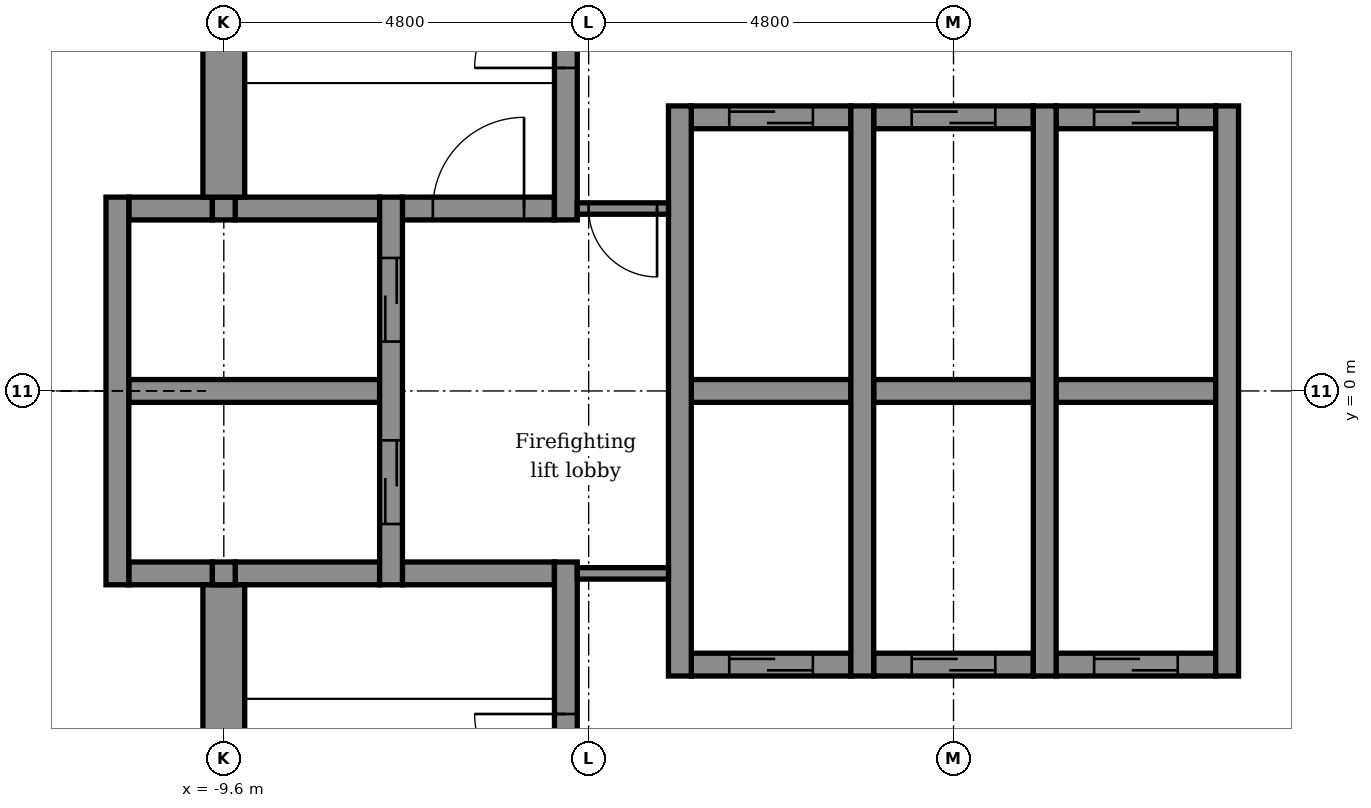
"""IFC4 building model, lengths in metres.
Left out: names, types, materials, properties, quantities, classifications, styles, units other than length and angle.
Written with IfcOpenShell. Run it as: python <this file> out.ifc"""

import sys

from ifc_helpers import new_model, si_unit, direction, frame, frame_2d, origin, place, context, subcontext, project, spatial, rectangle, extrude, element, fill, save


model = new_model("IFC4")
c1 = context("Model", 3, precision=1e-05, world=origin(), true_north=direction((0.0, 1.0)))
c2 = subcontext(c1, "Body", "Model", "MODEL_VIEW")
j1 = project(units=[si_unit("LENGTHUNIT", "METRE"), si_unit("PLANEANGLEUNIT", "RADIAN")], contexts=[c1])
p1 = place(None, origin())
s1 = spatial("IfcSite", under=j1, at=p1, CompositionType="ELEMENT")
p2 = place(p1, origin())
s2 = spatial("IfcBuilding", under=s1, at=p2, CompositionType="ELEMENT")
p3 = place(p2, frame((0.0, 0.0, 273.5)))
s3 = spatial("IfcBuildingStorey", under=s2, at=p3, CompositionType="ELEMENT", Elevation=273.5)
p4 = place(p3, frame((-3.45, -3.6, -0.15), z_axis=(0.0, 0.0, 1.0), x_axis=(1.0, 0.0, 0.0)))
e1 = element("IfcWall", 1, at=p4, inside=s3, PredefinedType="STANDARD", context=c2, shape_type="SweptSolid", body=[
    extrude(rectangle(XDim=2.1, YDim=0.3, at=frame_2d((1.05, 0.0))), origin(), (0.0, 0.0, 1.0), 3.9),
])
p5 = place(p4, frame((0.5, 0.0, 0.15)))
e2 = element("IfcOpeningElement", 2, at=p5, cuts=e1, PredefinedType="OPENING", context=c2, shape_type="SweptSolid", body=[
    extrude(rectangle(XDim=1.1, YDim=2.1, at=frame_2d((0.55, 1.05))), frame((0.0, 0.16, 0.0), z_axis=(0.0, -1.0, 0.0), x_axis=(1.0, 0.0, 0.0)), (0.0, 0.0, 1.0), 0.32),
])
p6 = place(p3, frame((-1.05, -3.6, -0.15), z_axis=(0.0, 0.0, 1.0), x_axis=(1.0, 0.0, 0.0)))
e3 = element("IfcWall", 3, at=p6, inside=s3, PredefinedType="STANDARD", context=c2, shape_type="SweptSolid", body=[
    extrude(rectangle(XDim=2.1, YDim=0.3, at=frame_2d((1.05, 0.0))), origin(), (0.0, 0.0, 1.0), 3.9),
])
p7 = place(p6, frame((0.5, 0.0, 0.15)))
e4 = element("IfcOpeningElement", 4, at=p7, cuts=e3, PredefinedType="OPENING", context=c2, shape_type="SweptSolid", body=[
    extrude(rectangle(XDim=1.1, YDim=2.1, at=frame_2d((0.55, 1.05))), frame((0.0, 0.16, 0.0), z_axis=(0.0, -1.0, 0.0), x_axis=(1.0, 0.0, 0.0)), (0.0, 0.0, 1.0), 0.32),
])
p8 = place(p3, frame((1.35, -3.6, -0.15), z_axis=(0.0, 0.0, 1.0), x_axis=(1.0, 0.0, 0.0)))
e5 = element("IfcWall", 5, at=p8, inside=s3, PredefinedType="STANDARD", context=c2, shape_type="SweptSolid", body=[
    extrude(rectangle(XDim=2.1, YDim=0.3, at=frame_2d((1.05, 0.0))), origin(), (0.0, 0.0, 1.0), 3.9),
])
p9 = place(p8, frame((0.5, 0.0, 0.15)))
e6 = element("IfcOpeningElement", 6, at=p9, cuts=e5, PredefinedType="OPENING", context=c2, shape_type="SweptSolid", body=[
    extrude(rectangle(XDim=1.1, YDim=2.1, at=frame_2d((0.55, 1.05))), frame((0.0, 0.16, 0.0), z_axis=(0.0, -1.0, 0.0), x_axis=(1.0, 0.0, 0.0)), (0.0, 0.0, 1.0), 0.32),
])
p10 = place(p3, frame((-10.85, -2.4, -0.15), z_axis=(0.0, 0.0, 1.0), x_axis=(1.0, 0.0, 0.0)))
e7 = element("IfcWall", 7, at=p10, inside=s3, PredefinedType="STANDARD", context=c2, shape_type="SweptSolid", body=[
    extrude(rectangle(XDim=1.1, YDim=0.3, at=frame_2d((0.55, 0.0))), origin(), (0.0, 0.0, 1.0), 3.9),
])
p11 = place(p3, frame((-9.45, -2.4, -0.15), z_axis=(0.0, 0.0, 1.0), x_axis=(1.0, 0.0, 0.0)))
e8 = element("IfcWall", 8, at=p11, inside=s3, PredefinedType="STANDARD", context=c2, shape_type="SweptSolid", body=[
    extrude(rectangle(XDim=1.9, YDim=0.3, at=frame_2d((0.95, 0.0))), origin(), (0.0, 0.0, 1.0), 3.9),
])
p12 = place(p3, frame((-7.25, -2.4, -0.15), z_axis=(0.0, 0.0, 1.0), x_axis=(1.0, 0.0, 0.0)))
e9 = element("IfcWall", 9, at=p12, inside=s3, PredefinedType="STANDARD", context=c2, shape_type="SweptSolid", body=[
    extrude(rectangle(XDim=2.0, YDim=0.3, at=frame_2d((1.0, 0.0))), origin(), (0.0, 0.0, 1.0), 3.9),
])
p13 = place(p3, frame((-10.85, 0.0, -0.15), z_axis=(0.0, 0.0, 1.0), x_axis=(1.0, 0.0, 0.0)))
e10 = element("IfcWall", 10, at=p13, inside=s3, PredefinedType="STANDARD", context=c2, shape_type="SweptSolid", body=[
    extrude(rectangle(XDim=3.3, YDim=0.3, at=frame_2d((1.65, 0.0))), origin(), (0.0, 0.0, 1.0), 3.9),
])
p14 = place(p3, frame((-3.45, 0.0, -0.15), z_axis=(0.0, 0.0, 1.0), x_axis=(1.0, 0.0, 0.0)))
e11 = element("IfcWall", 11, at=p14, inside=s3, PredefinedType="STANDARD", context=c2, shape_type="SweptSolid", body=[
    extrude(rectangle(XDim=2.1, YDim=0.3, at=frame_2d((1.05, 0.0))), origin(), (0.0, 0.0, 1.0), 3.9),
])
p15 = place(p3, frame((-1.05, 0.0, -0.15), z_axis=(0.0, 0.0, 1.0), x_axis=(1.0, 0.0, 0.0)))
e12 = element("IfcWall", 12, at=p15, inside=s3, PredefinedType="STANDARD", context=c2, shape_type="SweptSolid", body=[
    extrude(rectangle(XDim=2.1, YDim=0.3, at=frame_2d((1.05, 0.0))), origin(), (0.0, 0.0, 1.0), 3.9),
])
p16 = place(p3, frame((1.35, 0.0, -0.15), z_axis=(0.0, 0.0, 1.0), x_axis=(1.0, 0.0, 0.0)))
e13 = element("IfcWall", 13, at=p16, inside=s3, PredefinedType="STANDARD", context=c2, shape_type="SweptSolid", body=[
    extrude(rectangle(XDim=2.1, YDim=0.3, at=frame_2d((1.05, 0.0))), origin(), (0.0, 0.0, 1.0), 3.9),
])
p17 = place(p3, frame((-10.85, 2.4, -0.15), z_axis=(0.0, 0.0, 1.0), x_axis=(1.0, 0.0, 0.0)))
e14 = element("IfcWall", 14, at=p17, inside=s3, PredefinedType="STANDARD", context=c2, shape_type="SweptSolid", body=[
    extrude(rectangle(XDim=1.1, YDim=0.3, at=frame_2d((0.55, 0.0))), origin(), (0.0, 0.0, 1.0), 3.9),
])
p18 = place(p3, frame((-9.45, 2.4, -0.15), z_axis=(0.0, 0.0, 1.0), x_axis=(1.0, 0.0, 0.0)))
e15 = element("IfcWall", 15, at=p18, inside=s3, PredefinedType="STANDARD", context=c2, shape_type="SweptSolid", body=[
    extrude(rectangle(XDim=1.9, YDim=0.3, at=frame_2d((0.95, 0.0))), origin(), (0.0, 0.0, 1.0), 3.9),
])
p19 = place(p3, frame((-7.25, 2.4, -0.15), z_axis=(0.0, 0.0, 1.0), x_axis=(1.0, 0.0, 0.0)))
e16 = element("IfcWall", 16, at=p19, inside=s3, PredefinedType="STANDARD", context=c2, shape_type="SweptSolid", body=[
    extrude(rectangle(XDim=2.0, YDim=0.3, at=frame_2d((1.0, 0.0))), origin(), (0.0, 0.0, 1.0), 3.9),
])
p20 = place(p19, frame((0.4, 0.0, 0.15)))
e17 = element("IfcOpeningElement", 17, at=p20, cuts=e16, PredefinedType="OPENING", context=c2, shape_type="SweptSolid", body=[
    extrude(rectangle(XDim=1.2, YDim=2.1, at=frame_2d((0.6, 1.05))), frame((0.0, 0.16, 0.0), z_axis=(0.0, -1.0, 0.0), x_axis=(1.0, 0.0, 0.0)), (0.0, 0.0, 1.0), 0.32),
])
p21 = place(p3, frame((-3.45, 3.6, -0.15), z_axis=(0.0, 0.0, 1.0), x_axis=(1.0, 0.0, 0.0)))
e18 = element("IfcWall", 18, at=p21, inside=s3, PredefinedType="STANDARD", context=c2, shape_type="SweptSolid", body=[
    extrude(rectangle(XDim=2.1, YDim=0.3, at=frame_2d((1.05, 0.0))), origin(), (0.0, 0.0, 1.0), 3.9),
])
p22 = place(p21, frame((0.5, 0.0, 0.15)))
e19 = element("IfcOpeningElement", 19, at=p22, cuts=e18, PredefinedType="OPENING", context=c2, shape_type="SweptSolid", body=[
    extrude(rectangle(XDim=1.1, YDim=2.1, at=frame_2d((0.55, 1.05))), frame((0.0, 0.16, 0.0), z_axis=(0.0, -1.0, 0.0), x_axis=(1.0, 0.0, 0.0)), (0.0, 0.0, 1.0), 0.32),
])
p23 = place(p3, frame((-1.05, 3.6, -0.15), z_axis=(0.0, 0.0, 1.0), x_axis=(1.0, 0.0, 0.0)))
e20 = element("IfcWall", 20, at=p23, inside=s3, PredefinedType="STANDARD", context=c2, shape_type="SweptSolid", body=[
    extrude(rectangle(XDim=2.1, YDim=0.3, at=frame_2d((1.05, 0.0))), origin(), (0.0, 0.0, 1.0), 3.9),
])
p24 = place(p23, frame((0.5, 0.0, 0.15)))
e21 = element("IfcOpeningElement", 21, at=p24, cuts=e20, PredefinedType="OPENING", context=c2, shape_type="SweptSolid", body=[
    extrude(rectangle(XDim=1.1, YDim=2.1, at=frame_2d((0.55, 1.05))), frame((0.0, 0.16, 0.0), z_axis=(0.0, -1.0, 0.0), x_axis=(1.0, 0.0, 0.0)), (0.0, 0.0, 1.0), 0.32),
])
p25 = place(p3, frame((1.35, 3.6, -0.15), z_axis=(0.0, 0.0, 1.0), x_axis=(1.0, 0.0, 0.0)))
e22 = element("IfcWall", 22, at=p25, inside=s3, PredefinedType="STANDARD", context=c2, shape_type="SweptSolid", body=[
    extrude(rectangle(XDim=2.1, YDim=0.3, at=frame_2d((1.05, 0.0))), origin(), (0.0, 0.0, 1.0), 3.9),
])
p26 = place(p25, frame((0.5, 0.0, 0.15)))
e23 = element("IfcOpeningElement", 23, at=p26, cuts=e22, PredefinedType="OPENING", context=c2, shape_type="SweptSolid", body=[
    extrude(rectangle(XDim=1.1, YDim=2.1, at=frame_2d((0.55, 1.05))), frame((0.0, 0.16, 0.0), z_axis=(0.0, -1.0, 0.0), x_axis=(1.0, 0.0, 0.0)), (0.0, 0.0, 1.0), 0.32),
])
p27 = place(p3, frame((-11.0, -2.55, -0.15), z_axis=(0.0, 0.0, 1.0), x_axis=(0.0, 1.0, 0.0)))
e24 = element("IfcWall", 24, at=p27, inside=s3, PredefinedType="STANDARD", context=c2, shape_type="SweptSolid", body=[
    extrude(rectangle(XDim=5.1, YDim=0.3, at=frame_2d((2.55, 0.0))), origin(), (0.0, 0.0, 1.0), 3.9),
])
p28 = place(p3, frame((-9.6, -10.15, -0.15), z_axis=(0.0, 0.0, 1.0), x_axis=(0.0, 1.0, 0.0)))
e25 = element("IfcWall", 25, at=p28, inside=s3, PredefinedType="SHEAR", context=c2, shape_type="SweptSolid", body=[
    extrude(rectangle(XDim=7.6, YDim=0.55, at=frame_2d((3.8, 0.0))), origin(), (0.0, 0.0, 1.0), 3.9),
])
for number, where, z_axis, x_axis in (
    (26, (-9.6, -2.55, -0.15), (0.0, 0.0, 1.0), (0.0, 1.0, 0.0)),
    (27, (-9.6, 2.25, -0.15), (0.0, 0.0, 1.0), (0.0, 1.0, 0.0)),
):
    element("IfcWall", number, at=place(p3, frame(where, z_axis=z_axis, x_axis=x_axis)), inside=s3, PredefinedType="STANDARD", context=c2, shape_type="SweptSolid", body=[
        extrude(rectangle(XDim=0.3, YDim=0.3, at=frame_2d((0.15, 0.0))), origin(), (0.0, 0.0, 1.0), 3.9),
    ])
p29 = place(p3, frame((-9.6, 2.55, -0.15), z_axis=(0.0, 0.0, 1.0), x_axis=(0.0, 1.0, 0.0)))
e28 = element("IfcWall", 28, at=p29, inside=s3, PredefinedType="SHEAR", context=c2, shape_type="SweptSolid", body=[
    extrude(rectangle(XDim=7.6, YDim=0.55, at=frame_2d((3.8, 0.0))), origin(), (0.0, 0.0, 1.0), 3.9),
])
p30 = place(p3, frame((-7.4, -2.55, -0.15), z_axis=(0.0, 0.0, 1.0), x_axis=(0.0, 1.0, 0.0)))
e29 = element("IfcWall", 29, at=p30, inside=s3, PredefinedType="STANDARD", context=c2, shape_type="SweptSolid", body=[
    extrude(rectangle(XDim=5.1, YDim=0.3, at=frame_2d((2.55, 0.0))), origin(), (0.0, 0.0, 1.0), 3.9),
])
p31 = place(p30, frame((0.8, 0.0, 0.15)))
e30 = element("IfcOpeningElement", 30, at=p31, cuts=e29, PredefinedType="OPENING", context=c2, shape_type="SweptSolid", body=[
    extrude(rectangle(XDim=1.1, YDim=2.1, at=frame_2d((0.55, 1.05))), frame((0.0, 0.16, 0.0), z_axis=(0.0, -1.0, 0.0), x_axis=(1.0, 0.0, 0.0)), (0.0, 0.0, 1.0), 0.32),
])
p32 = place(p30, frame((3.2, 0.0, 0.15)))
e31 = element("IfcOpeningElement", 31, at=p32, cuts=e29, PredefinedType="OPENING", context=c2, shape_type="SweptSolid", body=[
    extrude(rectangle(XDim=1.1, YDim=2.1, at=frame_2d((0.55, 1.05))), frame((0.0, 0.16, 0.0), z_axis=(0.0, -1.0, 0.0), x_axis=(1.0, 0.0, 0.0)), (0.0, 0.0, 1.0), 0.32),
])
p33 = place(p3, frame((-5.1, -9.325, -0.15), z_axis=(0.0, 0.0, 1.0), x_axis=(0.0, 1.0, 0.0)))
e32 = element("IfcWall", 32, at=p33, inside=s3, PredefinedType="STANDARD", context=c2, shape_type="SweptSolid", body=[
    extrude(rectangle(XDim=7.075, YDim=0.3, at=frame_2d((3.538, 0.0))), origin(), (0.0, 0.0, 1.0), 3.9),
])
p34 = place(p33, frame((3.875, 0.0, 0.15)))
e33 = element("IfcOpeningElement", 33, at=p34, cuts=e32, PredefinedType="OPENING", context=c2, shape_type="SweptSolid", body=[
    extrude(rectangle(XDim=1.2, YDim=2.1, at=frame_2d((0.6, 1.05))), frame((0.0, 0.16, 0.0), z_axis=(0.0, -1.0, 0.0), x_axis=(1.0, 0.0, 0.0)), (0.0, 0.0, 1.0), 0.32),
])
p35 = place(p3, frame((-5.1, 2.25, -0.15), z_axis=(0.0, 0.0, 1.0), x_axis=(0.0, 1.0, 0.0)))
e34 = element("IfcWall", 34, at=p35, inside=s3, PredefinedType="STANDARD", context=c2, shape_type="SweptSolid", body=[
    extrude(rectangle(XDim=7.075, YDim=0.3, at=frame_2d((3.538, 0.0))), origin(), (0.0, 0.0, 1.0), 3.9),
])
p36 = place(p35, frame((2.0, 0.0, 0.15)))
e35 = element("IfcOpeningElement", 35, at=p36, cuts=e34, PredefinedType="OPENING", context=c2, shape_type="SweptSolid", body=[
    extrude(rectangle(XDim=1.2, YDim=2.1, at=frame_2d((0.6, 1.05))), frame((0.0, 0.16, 0.0), z_axis=(0.0, -1.0, 0.0), x_axis=(1.0, 0.0, 0.0)), (0.0, 0.0, 1.0), 0.32),
])
for number, where, z_axis, x_axis in (
    (36, (-3.6, -3.75, -0.15), (0.0, 0.0, 1.0), (0.0, 1.0, 0.0)),
    (37, (-1.2, -3.75, -0.15), (0.0, 0.0, 1.0), (0.0, 1.0, 0.0)),
    (38, (1.2, -3.75, -0.15), (0.0, 0.0, 1.0), (0.0, 1.0, 0.0)),
    (39, (3.6, -3.75, -0.15), (0.0, 0.0, 1.0), (0.0, 1.0, 0.0)),
):
    element("IfcWall", number, at=place(p3, frame(where, z_axis=z_axis, x_axis=x_axis)), inside=s3, PredefinedType="STANDARD", context=c2, shape_type="SweptSolid", body=[
        extrude(rectangle(XDim=7.5, YDim=0.3, at=frame_2d((3.75, 0.0))), origin(), (0.0, 0.0, 1.0), 3.9),
    ])
p37 = place(p3, frame((-4.95, 2.4, 0.0), z_axis=(0.0, 0.0, 1.0), x_axis=(1.0, 0.0, 0.0)))
e40 = element("IfcWall", 40, at=p37, inside=s3, PredefinedType="PARTITIONING", context=c2, shape_type="SweptSolid", body=[
    extrude(rectangle(XDim=1.2, YDim=0.15, at=frame_2d((0.6, 0.0))), origin(), (0.0, 0.0, 1.0), 3.75),
])
p38 = place(p37, frame((0.15, 0.0, 0.0)))
e41 = element("IfcOpeningElement", 41, at=p38, cuts=e40, PredefinedType="OPENING", context=c2, shape_type="SweptSolid", body=[
    extrude(rectangle(XDim=0.9, YDim=2.1, at=frame_2d((0.45, 1.05))), frame((0.0, 0.085, 0.0), z_axis=(0.0, -1.0, 0.0), x_axis=(1.0, 0.0, 0.0)), (0.0, 0.0, 1.0), 0.17),
])
p39 = place(p3, frame((-4.95, -2.4, 0.0), z_axis=(0.0, 0.0, 1.0), x_axis=(1.0, 0.0, 0.0)))
e42 = element("IfcWall", 42, at=p39, inside=s3, PredefinedType="PARTITIONING", context=c2, shape_type="SweptSolid", body=[
    extrude(rectangle(XDim=1.2, YDim=0.15, at=frame_2d((0.6, 0.0))), origin(), (0.0, 0.0, 1.0), 3.75),
])
p40 = place(p31, origin())
e43 = element("IfcDoor", 43, at=p40, inside=s3, OperationType="DOUBLE_DOOR_SLIDING", PredefinedType="DOOR", context=c2, shape_type="SweptSolid", body=[
    extrude(rectangle(XDim=1.1, YDim=2.1, at=frame_2d((0.55, 1.05))), frame((0.0, 0.025, 0.0), z_axis=(0.0, -1.0, 0.0), x_axis=(1.0, 0.0, 0.0)), (0.0, 0.0, 1.0), 0.05),
])
fill(e30, e43)
p41 = place(p32, origin())
e44 = element("IfcDoor", 44, at=p41, inside=s3, OperationType="DOUBLE_DOOR_SLIDING", PredefinedType="DOOR", context=c2, shape_type="SweptSolid", body=[
    extrude(rectangle(XDim=1.1, YDim=2.1, at=frame_2d((0.55, 1.05))), frame((0.0, 0.025, 0.0), z_axis=(0.0, -1.0, 0.0), x_axis=(1.0, 0.0, 0.0)), (0.0, 0.0, 1.0), 0.05),
])
fill(e31, e44)
p42 = place(p22, origin())
e45 = element("IfcDoor", 45, at=p42, inside=s3, OperationType="DOUBLE_DOOR_SLIDING", PredefinedType="DOOR", context=c2, shape_type="SweptSolid", body=[
    extrude(rectangle(XDim=1.1, YDim=2.1, at=frame_2d((0.55, 1.05))), frame((0.0, 0.025, 0.0), z_axis=(0.0, -1.0, 0.0), x_axis=(1.0, 0.0, 0.0)), (0.0, 0.0, 1.0), 0.05),
])
fill(e19, e45)
p43 = place(p24, origin())
e46 = element("IfcDoor", 46, at=p43, inside=s3, OperationType="DOUBLE_DOOR_SLIDING", PredefinedType="DOOR", context=c2, shape_type="SweptSolid", body=[
    extrude(rectangle(XDim=1.1, YDim=2.1, at=frame_2d((0.55, 1.05))), frame((0.0, 0.025, 0.0), z_axis=(0.0, -1.0, 0.0), x_axis=(1.0, 0.0, 0.0)), (0.0, 0.0, 1.0), 0.05),
])
fill(e21, e46)
p44 = place(p26, origin())
e47 = element("IfcDoor", 47, at=p44, inside=s3, OperationType="DOUBLE_DOOR_SLIDING", PredefinedType="DOOR", context=c2, shape_type="SweptSolid", body=[
    extrude(rectangle(XDim=1.1, YDim=2.1, at=frame_2d((0.55, 1.05))), frame((0.0, 0.025, 0.0), z_axis=(0.0, -1.0, 0.0), x_axis=(1.0, 0.0, 0.0)), (0.0, 0.0, 1.0), 0.05),
])
fill(e23, e47)
p45 = place(p5, origin())
e48 = element("IfcDoor", 48, at=p45, inside=s3, OperationType="DOUBLE_DOOR_SLIDING", PredefinedType="DOOR", context=c2, shape_type="SweptSolid", body=[
    extrude(rectangle(XDim=1.1, YDim=2.1, at=frame_2d((0.55, 1.05))), frame((0.0, 0.025, 0.0), z_axis=(0.0, -1.0, 0.0), x_axis=(1.0, 0.0, 0.0)), (0.0, 0.0, 1.0), 0.05),
])
fill(e2, e48)
p46 = place(p7, origin())
e49 = element("IfcDoor", 49, at=p46, inside=s3, OperationType="DOUBLE_DOOR_SLIDING", PredefinedType="DOOR", context=c2, shape_type="SweptSolid", body=[
    extrude(rectangle(XDim=1.1, YDim=2.1, at=frame_2d((0.55, 1.05))), frame((0.0, 0.025, 0.0), z_axis=(0.0, -1.0, 0.0), x_axis=(1.0, 0.0, 0.0)), (0.0, 0.0, 1.0), 0.05),
])
fill(e4, e49)
p47 = place(p9, origin())
e50 = element("IfcDoor", 50, at=p47, inside=s3, OperationType="DOUBLE_DOOR_SLIDING", PredefinedType="DOOR", context=c2, shape_type="SweptSolid", body=[
    extrude(rectangle(XDim=1.1, YDim=2.1, at=frame_2d((0.55, 1.05))), frame((0.0, 0.025, 0.0), z_axis=(0.0, -1.0, 0.0), x_axis=(1.0, 0.0, 0.0)), (0.0, 0.0, 1.0), 0.05),
])
fill(e6, e50)
p48 = place(p36, origin())
e51 = element("IfcDoor", 51, at=p48, inside=s3, OperationType="SINGLE_SWING_LEFT", PredefinedType="DOOR", context=c2, shape_type="SweptSolid", body=[
    extrude(rectangle(XDim=1.2, YDim=2.1, at=frame_2d((0.6, 1.05))), frame((0.0, 0.025, 0.0), z_axis=(0.0, -1.0, 0.0), x_axis=(1.0, 0.0, 0.0)), (0.0, 0.0, 1.0), 0.05),
])
fill(e35, e51)
p49 = place(p34, origin())
e52 = element("IfcDoor", 52, at=p49, inside=s3, OperationType="SINGLE_SWING_RIGHT", PredefinedType="DOOR", context=c2, shape_type="SweptSolid", body=[
    extrude(rectangle(XDim=1.2, YDim=2.1, at=frame_2d((0.6, 1.05))), frame((0.0, 0.025, 0.0), z_axis=(0.0, -1.0, 0.0), x_axis=(1.0, 0.0, 0.0)), (0.0, 0.0, 1.0), 0.05),
])
fill(e33, e52)
p50 = place(p38, frame((0.9, 0.0, 0.0), z_axis=(0.0, 0.0, 1.0), x_axis=(-1.0, 0.0, 0.0)))
e53 = element("IfcDoor", 53, at=p50, inside=s3, OperationType="SINGLE_SWING_RIGHT", PredefinedType="DOOR", context=c2, shape_type="SweptSolid", body=[
    extrude(rectangle(XDim=0.9, YDim=2.1, at=frame_2d((0.45, 1.05))), frame((0.0, 0.025, 0.0), z_axis=(0.0, -1.0, 0.0), x_axis=(1.0, 0.0, 0.0)), (0.0, 0.0, 1.0), 0.05),
])
fill(e41, e53)
p51 = place(p20, origin())
e54 = element("IfcDoor", 54, at=p51, inside=s3, OperationType="SINGLE_SWING_RIGHT", PredefinedType="DOOR", context=c2, shape_type="SweptSolid", body=[
    extrude(rectangle(XDim=1.2, YDim=2.1, at=frame_2d((0.6, 1.05))), frame((0.0, 0.025, 0.0), z_axis=(0.0, -1.0, 0.0), x_axis=(1.0, 0.0, 0.0)), (0.0, 0.0, 1.0), 0.05),
])
fill(e17, e54)
save(model, sys.argv[1])
